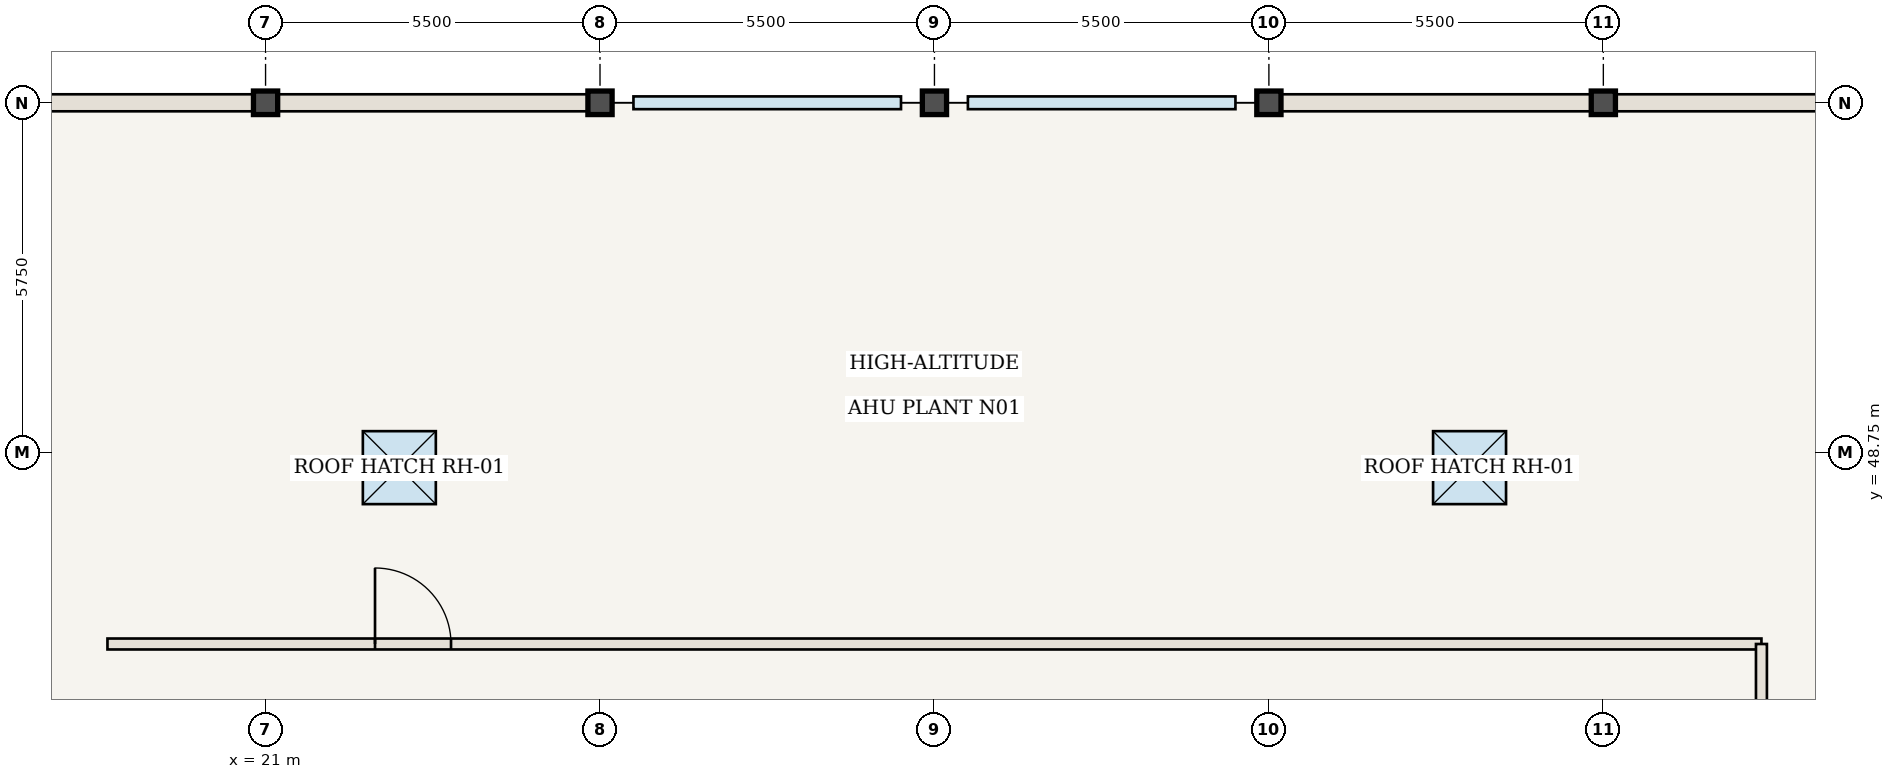
"""IFC4 building model, lengths in metres.
Left out: names, types, materials, properties, quantities, classifications, styles, units other than length and angle.
Written with IfcOpenShell. Run it as: python <this file> out.ifc"""

import sys

from ifc_helpers import new_model, si_unit, direction, frame, frame_2d, origin, origin_2d, place, context, subcontext, project, spatial, rectangle, i_section, extrude, element, fill, save


model = new_model("IFC4")
c1 = context("Model", 3, precision=1e-05, world=origin(), true_north=direction((0.0, 1.0)))
c2 = subcontext(c1, "Body", "Model", "MODEL_VIEW")
j1 = project(units=[si_unit("LENGTHUNIT", "METRE"), si_unit("PLANEANGLEUNIT", "RADIAN")], contexts=[c1])
p1 = place(None, origin())
s1 = spatial("IfcSite", under=j1, at=p1, CompositionType="ELEMENT")
p2 = place(p1, origin())
s2 = spatial("IfcBuilding", under=s1, at=p2, CompositionType="ELEMENT")
p3 = place(p2, frame((0.0, 0.0, 326.9)))
s3 = spatial("IfcBuildingStorey", under=s2, at=p3, CompositionType="ELEMENT", Elevation=326.9)
for number, where, z_axis, x_axis in (
    (1, (21.0, 54.5, 0.0), (0.0, 0.0, 1.0), (1.0, 0.0, 0.0)),
    (2, (26.5, 54.5, 0.0), (0.0, 0.0, 1.0), (1.0, 0.0, 0.0)),
    (3, (32.0, 54.5, 0.0), (0.0, 0.0, 1.0), (1.0, 0.0, 0.0)),
    (4, (37.5, 54.5, 0.0), (0.0, 0.0, 1.0), (1.0, 0.0, 0.0)),
    (5, (43.0, 54.5, 0.0), (0.0, 0.0, 1.0), (1.0, 0.0, 0.0)),
):
    element("IfcColumn", number, at=place(p3, frame(where, z_axis=z_axis, x_axis=x_axis)), inside=s3, PredefinedType="COLUMN", context=c2, shape_type="SweptSolid", body=[
        extrude(i_section(OverallWidth=0.398, OverallDepth=0.387, WebThickness=0.021, FlangeThickness=0.033, at=origin_2d()), origin(), (0.0, 0.0, 1.0), 4.55),
    ])
p4 = place(p3, frame((18.4, 45.6, 0.0), z_axis=(0.0, 0.0, 1.0), x_axis=(1.0, 0.0, 0.0)))
e6 = element("IfcWall", 6, at=p4, inside=s3, PredefinedType="STANDARD", context=c2, shape_type="SweptSolid", body=[
    extrude(rectangle(XDim=27.2, YDim=0.18, at=frame_2d((13.6, 0.0))), origin(), (0.0, 0.0, 1.0), 4.29),
])
p5 = place(p4, frame((4.4, 0.0, 0.0)))
e7 = element("IfcOpeningElement", 7, at=p5, cuts=e6, PredefinedType="OPENING", context=c2, shape_type="SweptSolid", body=[
    extrude(rectangle(XDim=1.25, YDim=2.2, at=frame_2d((0.625, 1.1))), frame((0.0, 0.1, 0.0), z_axis=(0.0, -1.0, 0.0), x_axis=(1.0, 0.0, 0.0)), (0.0, 0.0, 1.0), 0.2),
])
p6 = place(p3, frame((45.6, 18.4, 0.0), z_axis=(0.0, 0.0, 1.0), x_axis=(0.0, 1.0, 0.0)))
e8 = element("IfcWall", 8, at=p6, inside=s3, PredefinedType="STANDARD", context=c2, shape_type="SweptSolid", body=[
    extrude(rectangle(XDim=27.2, YDim=0.18, at=frame_2d((13.6, 0.0))), origin(), (0.0, 0.0, 1.0), 4.29),
])
p7 = place(p6, frame((14.55, 0.0, 0.0)))
e9 = element("IfcOpeningElement", 9, at=p7, cuts=e8, PredefinedType="OPENING", context=c2, shape_type="SweptSolid", body=[
    extrude(rectangle(XDim=1.25, YDim=2.2, at=frame_2d((0.625, 1.1))), frame((0.0, 0.1, 0.0), z_axis=(0.0, -1.0, 0.0), x_axis=(1.0, 0.0, 0.0)), (0.0, 0.0, 1.0), 0.2),
])
for number, where, z_axis, x_axis in (
    (10, (15.5, 54.5, 0.0), (0.0, 0.0, 1.0), (1.0, 0.0, 0.0)),
    (11, (21.0, 54.5, 0.0), (0.0, 0.0, 1.0), (1.0, 0.0, 0.0)),
    (12, (37.5, 54.5, 0.0), (0.0, 0.0, 1.0), (1.0, 0.0, 0.0)),
    (13, (43.0, 54.5, 0.0), (0.0, 0.0, 1.0), (1.0, 0.0, 0.0)),
):
    element("IfcWall", number, at=place(p3, frame(where, z_axis=z_axis, x_axis=x_axis)), inside=s3, PredefinedType="USERDEFINED", context=c2, shape_type="SweptSolid", body=[
        extrude(rectangle(XDim=5.5, YDim=0.28, at=frame_2d((2.75, 0.0))), origin(), (0.0, 0.0, 1.0), 3.57),
    ])
p8 = place(p5, origin())
e14 = element("IfcDoor", 14, at=p8, inside=s3, OperationType="SINGLE_SWING_LEFT", PredefinedType="DOOR", context=c2, shape_type="SweptSolid", body=[
    extrude(rectangle(XDim=1.25, YDim=2.2, at=frame_2d((0.625, 1.1))), frame((0.0, 0.025, 0.0), z_axis=(0.0, -1.0, 0.0), x_axis=(1.0, 0.0, 0.0)), (0.0, 0.0, 1.0), 0.05),
])
fill(e7, e14)
p9 = place(p3, frame((0.0, 0.0, -0.26)))
p10 = place(p9, frame((23.2, 48.5, 0.0)))
p11 = place(p10, frame((0.0, 0.0, 0.21)))
e15 = element("IfcWindow", 15, at=p11, inside=s3, PartitioningType="SINGLE_PANEL", PredefinedType="SKYLIGHT", context=c2, shape_type="SweptSolid", body=[
    extrude(rectangle(XDim=1.2, YDim=1.2, at=origin_2d()), origin(), (0.0, 0.0, 1.0), 0.05),
])
p12 = place(p9, frame((40.8, 48.5, 0.0)))
p13 = place(p12, frame((0.0, 0.0, 0.21)))
e16 = element("IfcWindow", 16, at=p13, inside=s3, PartitioningType="SINGLE_PANEL", PredefinedType="SKYLIGHT", context=c2, shape_type="SweptSolid", body=[
    extrude(rectangle(XDim=1.2, YDim=1.2, at=origin_2d()), origin(), (0.0, 0.0, 1.0), 0.05),
])
save(model, sys.argv[1])
